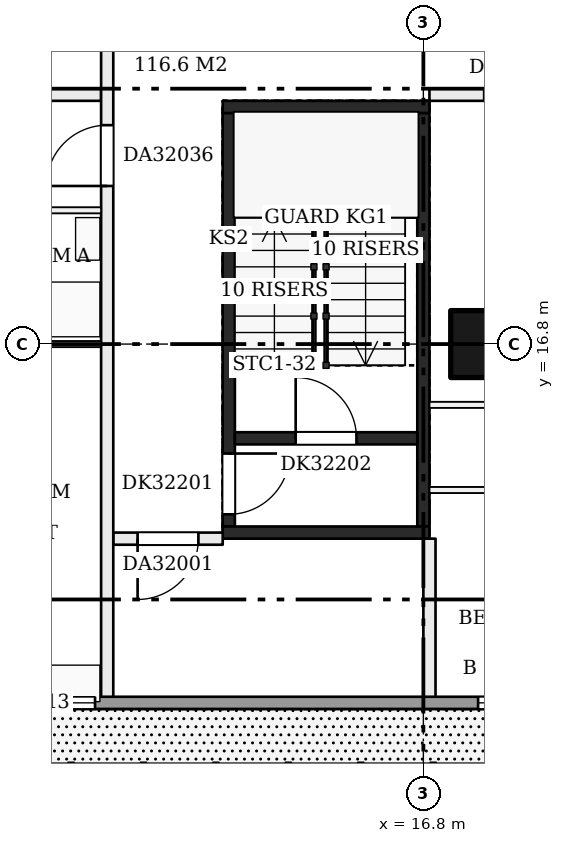
"""IFC4 building model, lengths in metres.
Left out: names, types, materials, properties, quantities, classifications, styles, units other than length and angle.
Written with IfcOpenShell. Run it as: python <this file> out.ifc"""

import sys

from ifc_helpers import new_model, si_unit, direction, frame, frame_2d, origin, origin_2d, place, context, subcontext, project, spatial, rectangle, extrude, element, fill, save


model = new_model("IFC4")
c1 = context("Model", 3, precision=1e-05, world=origin(), true_north=direction((0.0, 1.0)))
c2 = subcontext(c1, "Body", "Model", "MODEL_VIEW")
j1 = project(units=[si_unit("LENGTHUNIT", "METRE"), si_unit("PLANEANGLEUNIT", "RADIAN")], contexts=[c1])
p1 = place(None, origin())
s1 = spatial("IfcSite", under=j1, at=p1, CompositionType="ELEMENT")
p2 = place(p1, origin())
s2 = spatial("IfcBuilding", under=s1, at=p2, CompositionType="ELEMENT")
p3 = place(p2, frame((0.0, 0.0, 126.7)))
s3 = spatial("IfcBuildingStorey", under=s2, at=p3, CompositionType="ELEMENT", Elevation=126.7)
p4 = place(p3, frame((17.8, 16.8, 0.0), z_axis=(0.0, 0.0, 1.0), x_axis=(1.0, 0.0, 0.0)))
e1 = element("IfcColumn", 1, at=p4, inside=s3, PredefinedType="COLUMN", context=c2, shape_type="SweptSolid", body=[
    extrude(rectangle(XDim=1.1, YDim=1.1, at=origin_2d()), origin(), (0.0, 0.0, 1.0), 3.22),
])
p5 = place(p3, frame((13.6, 13.8, 0.0), z_axis=(0.0, 0.0, 1.0), x_axis=(0.0, 1.0, 0.0)))
e2 = element("IfcWall", 2, at=p5, inside=s3, PredefinedType="SHEAR", context=c2, shape_type="SweptSolid", body=[
    extrude(rectangle(XDim=6.8, YDim=0.2, at=frame_2d((3.4, 0.0))), origin(), (0.0, 0.0, 1.0), 3.22),
])
p6 = place(p5, frame((0.2, 0.0, 0.0)))
e3 = element("IfcOpeningElement", 3, at=p6, cuts=e2, PredefinedType="OPENING", context=c2, shape_type="SweptSolid", body=[
    extrude(rectangle(XDim=1.0, YDim=2.1, at=frame_2d((0.5, 1.05))), frame((0.0, 0.11, 0.0), z_axis=(0.0, -1.0, 0.0), x_axis=(1.0, 0.0, 0.0)), (0.0, 0.0, 1.0), 0.22),
])
p7 = place(p3, frame((16.8, 13.8, 0.0), z_axis=(0.0, 0.0, 1.0), x_axis=(0.0, 1.0, 0.0)))
e4 = element("IfcWall", 4, at=p7, inside=s3, PredefinedType="SHEAR", context=c2, shape_type="SweptSolid", body=[
    extrude(rectangle(XDim=6.8, YDim=0.2, at=frame_2d((3.4, 0.0))), origin(), (0.0, 0.0, 1.0), 3.22),
])
for number, where, z_axis, x_axis in (
    (5, (13.5, 13.7, 0.0), (0.0, 0.0, 1.0), (1.0, 0.0, 0.0)),
    (6, (13.5, 20.7, 0.0), (0.0, 0.0, 1.0), (1.0, 0.0, 0.0)),
):
    element("IfcWall", number, at=place(p3, frame(where, z_axis=z_axis, x_axis=x_axis)), inside=s3, PredefinedType="SHEAR", context=c2, shape_type="SweptSolid", body=[
        extrude(rectangle(XDim=3.4, YDim=0.2, at=frame_2d((1.7, 0.0))), origin(), (0.0, 0.0, 1.0), 3.22),
    ])
p8 = place(p3, frame((13.7, 15.25, 0.0), z_axis=(0.0, 0.0, 1.0), x_axis=(1.0, 0.0, 0.0)))
e7 = element("IfcWall", 7, at=p8, inside=s3, PredefinedType="SHEAR", context=c2, shape_type="SweptSolid", body=[
    extrude(rectangle(XDim=3.0, YDim=0.2, at=frame_2d((1.5, 0.0))), origin(), (0.0, 0.0, 1.0), 3.22),
])
p9 = place(p8, frame((1.0, 0.0, 0.0)))
e8 = element("IfcOpeningElement", 8, at=p9, cuts=e7, PredefinedType="OPENING", context=c2, shape_type="SweptSolid", body=[
    extrude(rectangle(XDim=1.0, YDim=2.1, at=frame_2d((0.5, 1.05))), frame((0.0, 0.11, 0.0), z_axis=(0.0, -1.0, 0.0), x_axis=(1.0, 0.0, 0.0)), (0.0, 0.0, 1.0), 0.22),
])
p10 = place(p3, frame((11.7, 13.6, 0.0), z_axis=(0.0, 0.0, 1.0), x_axis=(1.0, 0.0, 0.0)))
e9 = element("IfcWall", 9, at=p10, inside=s3, PredefinedType="PARTITIONING", context=c2, shape_type="SweptSolid", body=[
    extrude(rectangle(XDim=1.8, YDim=0.2, at=frame_2d((0.9, 0.0))), origin(), (0.0, 0.0, 1.0), 3.22),
])
p11 = place(p10, frame((0.4, 0.0, 0.0)))
e10 = element("IfcOpeningElement", 10, at=p11, cuts=e9, PredefinedType="OPENING", context=c2, shape_type="SweptSolid", body=[
    extrude(rectangle(XDim=1.0, YDim=2.1, at=frame_2d((0.5, 1.05))), frame((0.0, 0.11, 0.0), z_axis=(0.0, -1.0, 0.0), x_axis=(1.0, 0.0, 0.0)), (0.0, 0.0, 1.0), 0.22),
])
p12 = place(p3, frame((16.9, 14.4, 0.0), z_axis=(0.0, 0.0, 1.0), x_axis=(1.0, 0.0, 0.0)))
e11 = element("IfcWall", 11, at=p12, inside=s3, PredefinedType="PARTITIONING", context=c2, shape_type="SweptSolid", body=[
    extrude(rectangle(XDim=23.1, YDim=0.1, at=frame_2d((11.55, 0.0))), origin(), (0.0, 0.0, 1.0), 3.22),
])
p13 = place(p12, frame((1.6, 0.0, 0.0)))
e12 = element("IfcOpeningElement", 12, at=p13, cuts=e11, PredefinedType="OPENING", context=c2, shape_type="SweptSolid", body=[
    extrude(rectangle(XDim=0.9, YDim=2.1, at=frame_2d((0.45, 1.05))), frame((0.0, 0.06, 0.0), z_axis=(0.0, -1.0, 0.0), x_axis=(1.0, 0.0, 0.0)), (0.0, 0.0, 1.0), 0.12),
])
p14 = place(p12, frame((7.8, 0.0, 0.0)))
e13 = element("IfcOpeningElement", 13, at=p14, cuts=e11, PredefinedType="OPENING", context=c2, shape_type="SweptSolid", body=[
    extrude(rectangle(XDim=0.9, YDim=2.1, at=frame_2d((0.45, 1.05))), frame((0.0, 0.06, 0.0), z_axis=(0.0, -1.0, 0.0), x_axis=(1.0, 0.0, 0.0)), (0.0, 0.0, 1.0), 0.12),
])
p15 = place(p12, frame((17.4, 0.0, 0.0)))
e14 = element("IfcOpeningElement", 14, at=p15, cuts=e11, PredefinedType="OPENING", context=c2, shape_type="SweptSolid", body=[
    extrude(rectangle(XDim=0.9, YDim=2.1, at=frame_2d((0.45, 1.05))), frame((0.0, 0.06, 0.0), z_axis=(0.0, -1.0, 0.0), x_axis=(1.0, 0.0, 0.0)), (0.0, 0.0, 1.0), 0.12),
])
p16 = place(p3, frame((16.9, 15.8, 0.0), z_axis=(0.0, 0.0, 1.0), x_axis=(1.0, 0.0, 0.0)))
e15 = element("IfcWall", 15, at=p16, inside=s3, PredefinedType="PARTITIONING", context=c2, shape_type="SweptSolid", body=[
    extrude(rectangle(XDim=23.1, YDim=0.1, at=frame_2d((11.55, 0.0))), origin(), (0.0, 0.0, 1.0), 3.22),
])
p17 = place(p16, frame((1.7, 0.0, 0.0)))
e16 = element("IfcOpeningElement", 16, at=p17, cuts=e15, PredefinedType="OPENING", context=c2, shape_type="SweptSolid", body=[
    extrude(rectangle(XDim=0.9, YDim=2.1, at=frame_2d((0.45, 1.05))), frame((0.0, 0.06, 0.0), z_axis=(0.0, -1.0, 0.0), x_axis=(1.0, 0.0, 0.0)), (0.0, 0.0, 1.0), 0.12),
])
p18 = place(p16, frame((3.9, 0.0, 0.0)))
e17 = element("IfcOpeningElement", 17, at=p18, cuts=e15, PredefinedType="OPENING", context=c2, shape_type="SweptSolid", body=[
    extrude(rectangle(XDim=0.9, YDim=2.1, at=frame_2d((0.45, 1.05))), frame((0.0, 0.06, 0.0), z_axis=(0.0, -1.0, 0.0), x_axis=(1.0, 0.0, 0.0)), (0.0, 0.0, 1.0), 0.12),
])
p19 = place(p16, frame((6.6, 0.0, 0.0)))
e18 = element("IfcOpeningElement", 18, at=p19, cuts=e15, PredefinedType="OPENING", context=c2, shape_type="SweptSolid", body=[
    extrude(rectangle(XDim=0.9, YDim=2.1, at=frame_2d((0.45, 1.05))), frame((0.0, 0.06, 0.0), z_axis=(0.0, -1.0, 0.0), x_axis=(1.0, 0.0, 0.0)), (0.0, 0.0, 1.0), 0.12),
])
p20 = place(p16, frame((10.2, 0.0, 0.0)))
e19 = element("IfcOpeningElement", 19, at=p20, cuts=e15, PredefinedType="OPENING", context=c2, shape_type="SweptSolid", body=[
    extrude(rectangle(XDim=0.9, YDim=2.1, at=frame_2d((0.45, 1.05))), frame((0.0, 0.06, 0.0), z_axis=(0.0, -1.0, 0.0), x_axis=(1.0, 0.0, 0.0)), (0.0, 0.0, 1.0), 0.12),
])
p21 = place(p16, frame((13.1, 0.0, 0.0)))
e20 = element("IfcOpeningElement", 20, at=p21, cuts=e15, PredefinedType="OPENING", context=c2, shape_type="SweptSolid", body=[
    extrude(rectangle(XDim=0.9, YDim=2.1, at=frame_2d((0.45, 1.05))), frame((0.0, 0.06, 0.0), z_axis=(0.0, -1.0, 0.0), x_axis=(1.0, 0.0, 0.0)), (0.0, 0.0, 1.0), 0.12),
])
p22 = place(p16, frame((15.0, 0.0, 0.0)))
e21 = element("IfcOpeningElement", 21, at=p22, cuts=e15, PredefinedType="OPENING", context=c2, shape_type="SweptSolid", body=[
    extrude(rectangle(XDim=0.9, YDim=2.1, at=frame_2d((0.45, 1.05))), frame((0.0, 0.06, 0.0), z_axis=(0.0, -1.0, 0.0), x_axis=(1.0, 0.0, 0.0)), (0.0, 0.0, 1.0), 0.12),
])
p23 = place(p16, frame((18.5, 0.0, 0.0)))
e22 = element("IfcOpeningElement", 22, at=p23, cuts=e15, PredefinedType="OPENING", context=c2, shape_type="SweptSolid", body=[
    extrude(rectangle(XDim=0.9, YDim=2.1, at=frame_2d((0.45, 1.05))), frame((0.0, 0.06, 0.0), z_axis=(0.0, -1.0, 0.0), x_axis=(1.0, 0.0, 0.0)), (0.0, 0.0, 1.0), 0.12),
])
p24 = place(p16, frame((21.2, 0.0, 0.0)))
e23 = element("IfcOpeningElement", 23, at=p24, cuts=e15, PredefinedType="OPENING", context=c2, shape_type="SweptSolid", body=[
    extrude(rectangle(XDim=0.9, YDim=2.1, at=frame_2d((0.45, 1.05))), frame((0.0, 0.06, 0.0), z_axis=(0.0, -1.0, 0.0), x_axis=(1.0, 0.0, 0.0)), (0.0, 0.0, 1.0), 0.12),
])
p25 = place(p3, frame((2.5, 16.8, 0.0), z_axis=(0.0, 0.0, 1.0), x_axis=(1.0, 0.0, 0.0)))
e24 = element("IfcWall", 24, at=p25, inside=s3, PredefinedType="PARTITIONING", context=c2, shape_type="SweptSolid", body=[
    extrude(rectangle(XDim=9.0, YDim=0.1, at=frame_2d((4.5, 0.0))), origin(), (0.0, 0.0, 1.0), 3.22),
])
p26 = place(p25, frame((3.7, 0.0, 0.0)))
e25 = element("IfcOpeningElement", 25, at=p26, cuts=e24, PredefinedType="OPENING", context=c2, shape_type="SweptSolid", body=[
    extrude(rectangle(XDim=0.9, YDim=2.1, at=frame_2d((0.45, 1.05))), frame((0.0, 0.06, 0.0), z_axis=(0.0, -1.0, 0.0), x_axis=(1.0, 0.0, 0.0)), (0.0, 0.0, 1.0), 0.12),
])
p27 = place(p3, frame((7.45, 19.0, 0.0), z_axis=(0.0, 0.0, 1.0), x_axis=(1.0, 0.0, 0.0)))
e26 = element("IfcWall", 26, at=p27, inside=s3, PredefinedType="PARTITIONING", context=c2, shape_type="SweptSolid", body=[
    extrude(rectangle(XDim=4.05, YDim=0.1, at=frame_2d((2.025, 0.0))), origin(), (0.0, 0.0, 1.0), 3.22),
])
p28 = place(p3, frame((2.5, 20.9, 0.0), z_axis=(0.0, 0.0, 1.0), x_axis=(1.0, 0.0, 0.0)))
e27 = element("IfcWall", 27, at=p28, inside=s3, PredefinedType="PARTITIONING", context=c2, shape_type="SweptSolid", body=[
    extrude(rectangle(XDim=9.0, YDim=0.2, at=frame_2d((4.5, 0.0))), origin(), (0.0, 0.0, 1.0), 3.22),
])
p29 = place(p3, frame((16.9, 20.9, 0.0), z_axis=(0.0, 0.0, 1.0), x_axis=(1.0, 0.0, 0.0)))
e28 = element("IfcWall", 28, at=p29, inside=s3, PredefinedType="PARTITIONING", context=c2, shape_type="SweptSolid", body=[
    extrude(rectangle(XDim=23.3, YDim=0.2, at=frame_2d((11.65, 0.0))), origin(), (0.0, 0.0, 1.0), 3.22),
])
p30 = place(p29, frame((0.9, 0.0, 0.0)))
e29 = element("IfcOpeningElement", 29, at=p30, cuts=e28, PredefinedType="OPENING", context=c2, shape_type="SweptSolid", body=[
    extrude(rectangle(XDim=1.0, YDim=2.1, at=frame_2d((0.5, 1.05))), frame((0.0, 0.11, 0.0), z_axis=(0.0, -1.0, 0.0), x_axis=(1.0, 0.0, 0.0)), (0.0, 0.0, 1.0), 0.22),
])
p31 = place(p3, frame((11.6, 10.9, 0.0), z_axis=(0.0, 0.0, 1.0), x_axis=(0.0, 1.0, 0.0)))
e30 = element("IfcWall", 30, at=p31, inside=s3, PredefinedType="PARTITIONING", context=c2, shape_type="SweptSolid", body=[
    extrude(rectangle(XDim=31.1, YDim=0.2, at=frame_2d((15.55, 0.0))), origin(), (0.0, 0.0, 1.0), 3.22),
])
p32 = place(p31, frame((8.5, 0.0, 0.0)))
e31 = element("IfcOpeningElement", 31, at=p32, cuts=e30, PredefinedType="OPENING", context=c2, shape_type="SweptSolid", body=[
    extrude(rectangle(XDim=1.0, YDim=2.1, at=frame_2d((0.5, 1.05))), frame((0.0, 0.11, 0.0), z_axis=(0.0, -1.0, 0.0), x_axis=(1.0, 0.0, 0.0)), (0.0, 0.0, 1.0), 0.22),
])
p33 = place(p31, frame((12.937, 0.0, 0.0)))
e32 = element("IfcOpeningElement", 32, at=p33, cuts=e30, PredefinedType="OPENING", context=c2, shape_type="SweptSolid", body=[
    extrude(rectangle(XDim=1.0, YDim=2.1, at=frame_2d((0.5, 1.05))), frame((0.0, 0.11, 0.0), z_axis=(0.0, -1.0, 0.0), x_axis=(1.0, 0.0, 0.0)), (0.0, 0.0, 1.0), 0.22),
])
p34 = place(p3, frame((16.9, 10.9, 0.0), z_axis=(0.0, 0.0, 1.0), x_axis=(0.0, 1.0, 0.0)))
e33 = element("IfcWall", 33, at=p34, inside=s3, PredefinedType="PARTITIONING", context=c2, shape_type="SweptSolid", body=[
    extrude(rectangle(XDim=2.7, YDim=0.2, at=frame_2d((1.35, 0.0))), origin(), (0.0, 0.0, 1.0), 3.22),
])
p35 = place(p3, frame((4.8, 10.9, 0.0), z_axis=(0.0, 0.0, 1.0), x_axis=(1.0, 0.0, 0.0)))
e34 = element("IfcWall", 34, at=p35, inside=s3, PredefinedType="SOLIDWALL", context=c2, shape_type="SweptSolid", body=[
    extrude(rectangle(XDim=37.2, YDim=0.2, at=frame_2d((18.6, 0.0))), origin(), (0.0, 0.0, 1.0), 3.22),
])
p36 = place(p35, frame((0.3, 0.0, 0.9)))
e35 = element("IfcOpeningElement", 35, at=p36, cuts=e34, PredefinedType="OPENING", context=c2, shape_type="SweptSolid", body=[
    extrude(rectangle(XDim=2.4, YDim=1.5, at=frame_2d((1.2, 0.75))), frame((0.0, 0.11, 0.0), z_axis=(0.0, -1.0, 0.0), x_axis=(1.0, 0.0, 0.0)), (0.0, 0.0, 1.0), 0.22),
])
p37 = place(p35, frame((4.2, 0.0, 0.9)))
e36 = element("IfcOpeningElement", 36, at=p37, cuts=e34, PredefinedType="OPENING", context=c2, shape_type="SweptSolid", body=[
    extrude(rectangle(XDim=2.4, YDim=1.5, at=frame_2d((1.2, 0.75))), frame((0.0, 0.11, 0.0), z_axis=(0.0, -1.0, 0.0), x_axis=(1.0, 0.0, 0.0)), (0.0, 0.0, 1.0), 0.22),
])
p38 = place(p35, frame((12.9, 0.0, 0.9)))
e37 = element("IfcOpeningElement", 37, at=p38, cuts=e34, PredefinedType="OPENING", context=c2, shape_type="SweptSolid", body=[
    extrude(rectangle(XDim=2.4, YDim=1.5, at=frame_2d((1.2, 0.75))), frame((0.0, 0.11, 0.0), z_axis=(0.0, -1.0, 0.0), x_axis=(1.0, 0.0, 0.0)), (0.0, 0.0, 1.0), 0.22),
])
p39 = place(p35, frame((17.1, 0.0, 0.0)))
e38 = element("IfcOpeningElement", 38, at=p39, cuts=e34, PredefinedType="OPENING", context=c2, shape_type="SweptSolid", body=[
    extrude(rectangle(XDim=2.4, YDim=2.2, at=frame_2d((1.2, 1.1))), frame((0.0, 0.11, 0.0), z_axis=(0.0, -1.0, 0.0), x_axis=(1.0, 0.0, 0.0)), (0.0, 0.0, 1.0), 0.22),
])
p40 = place(p35, frame((21.3, 0.0, 0.0)))
e39 = element("IfcOpeningElement", 39, at=p40, cuts=e34, PredefinedType="OPENING", context=c2, shape_type="SweptSolid", body=[
    extrude(rectangle(XDim=2.4, YDim=2.2, at=frame_2d((1.2, 1.1))), frame((0.0, 0.11, 0.0), z_axis=(0.0, -1.0, 0.0), x_axis=(1.0, 0.0, 0.0)), (0.0, 0.0, 1.0), 0.22),
])
p41 = place(p35, frame((25.5, 0.0, 0.0)))
e40 = element("IfcOpeningElement", 40, at=p41, cuts=e34, PredefinedType="OPENING", context=c2, shape_type="SweptSolid", body=[
    extrude(rectangle(XDim=2.4, YDim=2.2, at=frame_2d((1.2, 1.1))), frame((0.0, 0.11, 0.0), z_axis=(0.0, -1.0, 0.0), x_axis=(1.0, 0.0, 0.0)), (0.0, 0.0, 1.0), 0.22),
])
p42 = place(p35, frame((29.7, 0.0, 0.0)))
e41 = element("IfcOpeningElement", 41, at=p42, cuts=e34, PredefinedType="OPENING", context=c2, shape_type="SweptSolid", body=[
    extrude(rectangle(XDim=2.4, YDim=2.2, at=frame_2d((1.2, 1.1))), frame((0.0, 0.11, 0.0), z_axis=(0.0, -1.0, 0.0), x_axis=(1.0, 0.0, 0.0)), (0.0, 0.0, 1.0), 0.22),
])
p43 = place(p35, frame((33.9, 0.0, 0.0)))
e42 = element("IfcOpeningElement", 42, at=p43, cuts=e34, PredefinedType="OPENING", context=c2, shape_type="SweptSolid", body=[
    extrude(rectangle(XDim=1.3, YDim=2.2, at=frame_2d((0.65, 1.1))), frame((0.0, 0.11, 0.0), z_axis=(0.0, -1.0, 0.0), x_axis=(1.0, 0.0, 0.0)), (0.0, 0.0, 1.0), 0.22),
])
p44 = place(p6, frame((1.0, 0.0, 0.0), z_axis=(0.0, 0.0, 1.0), x_axis=(-1.0, 0.0, 0.0)))
e43 = element("IfcDoor", 43, at=p44, inside=s3, OperationType="SINGLE_SWING_LEFT", PredefinedType="DOOR", context=c2, shape_type="SweptSolid", body=[
    extrude(rectangle(XDim=1.0, YDim=2.1, at=frame_2d((0.5, 1.05))), frame((0.0, 0.025, 0.0), z_axis=(0.0, -1.0, 0.0), x_axis=(1.0, 0.0, 0.0)), (0.0, 0.0, 1.0), 0.05),
])
fill(e3, e43)
p45 = place(p9, origin())
e44 = element("IfcDoor", 44, at=p45, inside=s3, OperationType="SINGLE_SWING_LEFT", PredefinedType="DOOR", context=c2, shape_type="SweptSolid", body=[
    extrude(rectangle(XDim=1.0, YDim=2.1, at=frame_2d((0.5, 1.05))), frame((0.0, 0.025, 0.0), z_axis=(0.0, -1.0, 0.0), x_axis=(1.0, 0.0, 0.0)), (0.0, 0.0, 1.0), 0.05),
])
fill(e8, e44)
p46 = place(p11, frame((1.0, 0.0, 0.0), z_axis=(0.0, 0.0, 1.0), x_axis=(-1.0, 0.0, 0.0)))
e45 = element("IfcDoor", 45, at=p46, inside=s3, OperationType="SINGLE_SWING_RIGHT", PredefinedType="DOOR", context=c2, shape_type="SweptSolid", body=[
    extrude(rectangle(XDim=1.0, YDim=2.1, at=frame_2d((0.5, 1.05))), frame((0.0, 0.025, 0.0), z_axis=(0.0, -1.0, 0.0), x_axis=(1.0, 0.0, 0.0)), (0.0, 0.0, 1.0), 0.05),
])
fill(e10, e45)
p47 = place(p30, frame((1.0, 0.0, 0.0), z_axis=(0.0, 0.0, 1.0), x_axis=(-1.0, 0.0, 0.0)))
e46 = element("IfcDoor", 46, at=p47, inside=s3, OperationType="SINGLE_SWING_LEFT", PredefinedType="DOOR", context=c2, shape_type="SweptSolid", body=[
    extrude(rectangle(XDim=1.0, YDim=2.1, at=frame_2d((0.5, 1.05))), frame((0.0, 0.025, 0.0), z_axis=(0.0, -1.0, 0.0), x_axis=(1.0, 0.0, 0.0)), (0.0, 0.0, 1.0), 0.05),
])
fill(e29, e46)
p48 = place(p32, origin())
e47 = element("IfcDoor", 47, at=p48, inside=s3, OperationType="SINGLE_SWING_LEFT", PredefinedType="DOOR", context=c2, shape_type="SweptSolid", body=[
    extrude(rectangle(XDim=1.0, YDim=2.1, at=frame_2d((0.5, 1.05))), frame((0.0, 0.025, 0.0), z_axis=(0.0, -1.0, 0.0), x_axis=(1.0, 0.0, 0.0)), (0.0, 0.0, 1.0), 0.05),
])
fill(e31, e47)
p49 = place(p37, origin())
e48 = element("IfcWindow", 48, at=p49, inside=s3, PartitioningType="SINGLE_PANEL", PredefinedType="WINDOW", context=c2, shape_type="SweptSolid", body=[
    extrude(rectangle(XDim=2.4, YDim=1.5, at=frame_2d((1.2, 0.75))), frame((0.0, 0.03, 0.0), z_axis=(0.0, -1.0, 0.0), x_axis=(1.0, 0.0, 0.0)), (0.0, 0.0, 1.0), 0.06),
])
fill(e36, e48)
p50 = place(p38, origin())
e49 = element("IfcWindow", 49, at=p50, inside=s3, PartitioningType="SINGLE_PANEL", PredefinedType="WINDOW", context=c2, shape_type="SweptSolid", body=[
    extrude(rectangle(XDim=2.4, YDim=1.5, at=frame_2d((1.2, 0.75))), frame((0.0, 0.03, 0.0), z_axis=(0.0, -1.0, 0.0), x_axis=(1.0, 0.0, 0.0)), (0.0, 0.0, 1.0), 0.06),
])
fill(e37, e49)
save(model, sys.argv[1])
